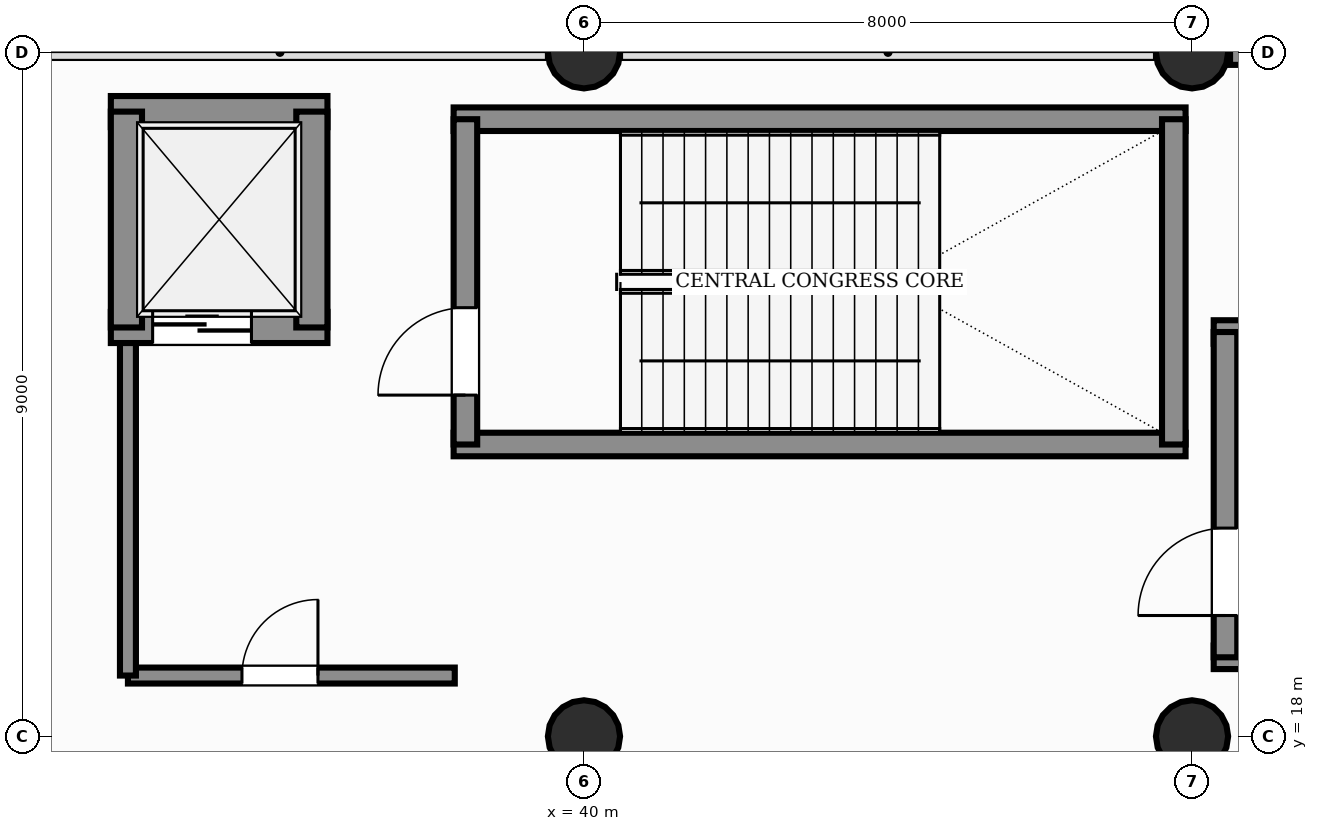
"""IFC4 building model, lengths in metres.
Left out: names, types, materials, properties, quantities, classifications, styles, units other than length and angle.
Written with IfcOpenShell. Run it as: python <this file> out.ifc"""

import sys

from ifc_helpers import new_model, si_unit, direction, frame, frame_2d, origin, origin_2d, place, context, subcontext, project, spatial, rectangle, circle, extrude, element, fill, save


model = new_model("IFC4")
c1 = context("Model", 3, precision=1e-05, world=origin(), true_north=direction((0.0, 1.0)))
c2 = subcontext(c1, "Body", "Model", "MODEL_VIEW")
j1 = project(units=[si_unit("LENGTHUNIT", "METRE"), si_unit("PLANEANGLEUNIT", "RADIAN")], contexts=[c1])
p1 = place(None, origin())
s1 = spatial("IfcSite", under=j1, at=p1, CompositionType="ELEMENT")
p2 = place(p1, origin())
s2 = spatial("IfcBuilding", under=s1, at=p2, CompositionType="ELEMENT")
p3 = place(p2, origin())
s3 = spatial("IfcBuildingStorey", under=s2, at=p3, CompositionType="ELEMENT", Elevation=0.0)
for number, where, z_axis, x_axis in (
    (1, (40.0, 18.0, 0.0), (0.0, 0.0, 1.0), (1.0, 0.0, 0.0)),
    (2, (40.0, 27.0, 0.0), (0.0, 0.0, 1.0), (1.0, 0.0, 0.0)),
    (3, (48.0, 18.0, 0.0), (0.0, 0.0, 1.0), (1.0, 0.0, 0.0)),
    (4, (48.0, 27.0, 0.0), (0.0, 0.0, 1.0), (1.0, 0.0, 0.0)),
):
    element("IfcColumn", number, at=place(p3, frame(where, z_axis=z_axis, x_axis=x_axis)), inside=s3, PredefinedType="COLUMN", context=c2, shape_type="SweptSolid", body=[
        extrude(circle(Radius=0.475, at=origin_2d()), origin(), (0.0, 0.0, 1.0), 6.0),
    ])
p4 = place(p3, frame((48.5, 27.0, 0.0), z_axis=(0.0, 0.0, 1.0), x_axis=(1.0, 0.0, 0.0)))
e5 = element("IfcWall", 5, at=p4, inside=s3, PredefinedType="SOLIDWALL", context=c2, shape_type="SweptSolid", body=[
    extrude(rectangle(XDim=7.0, YDim=0.33, at=frame_2d((3.5, 0.0))), origin(), (0.0, 0.0, 1.0), 4.7),
])
p5 = place(p4, frame((2.4, 0.0, 0.0)))
e6 = element("IfcOpeningElement", 6, at=p5, cuts=e5, PredefinedType="OPENING", context=c2, shape_type="SweptSolid", body=[
    extrude(rectangle(XDim=2.2, YDim=2.35, at=frame_2d((1.1, 1.175))), frame((0.0, 0.175, 0.0), z_axis=(0.0, -1.0, 0.0), x_axis=(1.0, 0.0, 0.0)), (0.0, 0.0, 1.0), 0.35),
])
for number, where, z_axis, x_axis in (
    (7, (38.285, 21.84, 0.0), (0.0, 0.0, 1.0), (1.0, 0.0, 0.0)),
    (8, (38.285, 26.12, 0.0), (0.0, 0.0, 1.0), (1.0, 0.0, 0.0)),
):
    element("IfcWall", number, at=place(p3, frame(where, z_axis=z_axis, x_axis=x_axis)), inside=s3, PredefinedType="SHEAR", context=c2, shape_type="SweptSolid", body=[
        extrude(rectangle(XDim=9.63, YDim=0.31, at=frame_2d((4.815, 0.0))), origin(), (0.0, 0.0, 1.0), 6.0),
    ])
p6 = place(p3, frame((38.44, 21.84, 0.0), z_axis=(0.0, 0.0, 1.0), x_axis=(0.0, 1.0, 0.0)))
e9 = element("IfcWall", 9, at=p6, inside=s3, PredefinedType="SHEAR", context=c2, shape_type="SweptSolid", body=[
    extrude(rectangle(XDim=4.28, YDim=0.31, at=frame_2d((2.14, 0.0))), origin(), (0.0, 0.0, 1.0), 6.0),
])
p7 = place(p6, frame((0.65, 0.0, 0.0)))
e10 = element("IfcOpeningElement", 10, at=p7, cuts=e9, PredefinedType="OPENING", context=c2, shape_type="SweptSolid", body=[
    extrude(rectangle(XDim=1.15, YDim=2.2, at=frame_2d((0.575, 1.1))), frame((0.0, 0.165, 0.0), z_axis=(0.0, -1.0, 0.0), x_axis=(1.0, 0.0, 0.0)), (0.0, 0.0, 1.0), 0.33),
])
p8 = place(p3, frame((47.76, 21.84, 0.0), z_axis=(0.0, 0.0, 1.0), x_axis=(0.0, 1.0, 0.0)))
e11 = element("IfcWall", 11, at=p8, inside=s3, PredefinedType="SHEAR", context=c2, shape_type="SweptSolid", body=[
    extrude(rectangle(XDim=4.28, YDim=0.31, at=frame_2d((2.14, 0.0))), origin(), (0.0, 0.0, 1.0), 6.0),
])
p9 = place(p3, frame((34.0, 18.8, 0.0), z_axis=(0.0, 0.0, 1.0), x_axis=(1.0, 0.0, 0.0)))
e12 = element("IfcWall", 12, at=p9, inside=s3, PredefinedType="PARTITIONING", context=c2, shape_type="SweptSolid", body=[
    extrude(rectangle(XDim=4.3, YDim=0.21, at=frame_2d((2.15, 0.0))), origin(), (0.0, 0.0, 1.0), 4.65),
])
p10 = place(p9, frame((1.5, 0.0, 0.0)))
e13 = element("IfcOpeningElement", 13, at=p10, cuts=e12, PredefinedType="OPENING", context=c2, shape_type="SweptSolid", body=[
    extrude(rectangle(XDim=1.0, YDim=2.15, at=frame_2d((0.5, 1.075))), frame((0.0, 0.115, 0.0), z_axis=(0.0, -1.0, 0.0), x_axis=(1.0, 0.0, 0.0)), (0.0, 0.0, 1.0), 0.23),
])
p11 = place(p3, frame((34.0, 18.8, 0.0), z_axis=(0.0, 0.0, 1.0), x_axis=(0.0, 1.0, 0.0)))
e14 = element("IfcWall", 14, at=p11, inside=s3, PredefinedType="PARTITIONING", context=c2, shape_type="SweptSolid", body=[
    extrude(rectangle(XDim=4.6, YDim=0.21, at=frame_2d((2.3, 0.0))), origin(), (0.0, 0.0, 1.0), 4.65),
])
p12 = place(p3, frame((33.775, 23.38, 0.0), z_axis=(0.0, 0.0, 1.0), x_axis=(1.0, 0.0, 0.0)))
e15 = element("IfcWall", 15, at=p12, inside=s3, PredefinedType="SHEAR", context=c2, shape_type="SweptSolid", body=[
    extrude(rectangle(XDim=2.85, YDim=0.41, at=frame_2d((1.425, 0.0))), origin(), (0.0, 0.0, 1.0), 6.0),
])
p13 = place(p12, frame((0.55, 0.0, 0.0)))
e16 = element("IfcOpeningElement", 16, at=p13, cuts=e15, PredefinedType="OPENING", context=c2, shape_type="SweptSolid", body=[
    extrude(rectangle(XDim=1.3, YDim=2.25, at=frame_2d((0.65, 1.125))), frame((0.0, 0.215, 0.0), z_axis=(0.0, -1.0, 0.0), x_axis=(1.0, 0.0, 0.0)), (0.0, 0.0, 1.0), 0.43),
])
p14 = place(p3, frame((33.775, 26.22, 0.0), z_axis=(0.0, 0.0, 1.0), x_axis=(1.0, 0.0, 0.0)))
e17 = element("IfcWall", 17, at=p14, inside=s3, PredefinedType="SHEAR", context=c2, shape_type="SweptSolid", body=[
    extrude(rectangle(XDim=2.85, YDim=0.41, at=frame_2d((1.425, 0.0))), origin(), (0.0, 0.0, 1.0), 6.0),
])
for number, where, z_axis, x_axis in (
    (18, (33.98, 23.38, 0.0), (0.0, 0.0, 1.0), (0.0, 1.0, 0.0)),
    (19, (36.42, 23.38, 0.0), (0.0, 0.0, 1.0), (0.0, 1.0, 0.0)),
):
    element("IfcWall", number, at=place(p3, frame(where, z_axis=z_axis, x_axis=x_axis)), inside=s3, PredefinedType="SHEAR", context=c2, shape_type="SweptSolid", body=[
        extrude(rectangle(XDim=2.84, YDim=0.41, at=frame_2d((1.42, 0.0))), origin(), (0.0, 0.0, 1.0), 6.0),
    ])
for number, where, z_axis, x_axis in (
    (20, (48.285, 19.04, 0.0), (0.0, 0.0, 1.0), (1.0, 0.0, 0.0)),
    (21, (48.285, 23.32, 0.0), (0.0, 0.0, 1.0), (1.0, 0.0, 0.0)),
):
    element("IfcWall", number, at=place(p3, frame(where, z_axis=z_axis, x_axis=x_axis)), inside=s3, PredefinedType="SHEAR", context=c2, shape_type="SweptSolid", body=[
        extrude(rectangle(XDim=9.63, YDim=0.31, at=frame_2d((4.815, 0.0))), origin(), (0.0, 0.0, 1.0), 6.0),
    ])
p15 = place(p3, frame((48.44, 19.04, 0.0), z_axis=(0.0, 0.0, 1.0), x_axis=(0.0, 1.0, 0.0)))
e22 = element("IfcWall", 22, at=p15, inside=s3, PredefinedType="SHEAR", context=c2, shape_type="SweptSolid", body=[
    extrude(rectangle(XDim=4.28, YDim=0.31, at=frame_2d((2.14, 0.0))), origin(), (0.0, 0.0, 1.0), 6.0),
])
p16 = place(p15, frame((0.55, 0.0, 0.0)))
e23 = element("IfcOpeningElement", 23, at=p16, cuts=e22, PredefinedType="OPENING", context=c2, shape_type="SweptSolid", body=[
    extrude(rectangle(XDim=1.15, YDim=2.2, at=frame_2d((0.575, 1.1))), frame((0.0, 0.165, 0.0), z_axis=(0.0, -1.0, 0.0), x_axis=(1.0, 0.0, 0.0)), (0.0, 0.0, 1.0), 0.33),
])
p17 = place(p7, origin())
e24 = element("IfcDoor", 24, at=p17, inside=s3, OperationType="SINGLE_SWING_LEFT", PredefinedType="DOOR", context=c2, shape_type="SweptSolid", body=[
    extrude(rectangle(XDim=1.15, YDim=2.2, at=frame_2d((0.575, 1.1))), frame((0.0, 0.025, 0.0), z_axis=(0.0, -1.0, 0.0), x_axis=(1.0, 0.0, 0.0)), (0.0, 0.0, 1.0), 0.05),
])
fill(e10, e24)
p18 = place(p10, origin())
e25 = element("IfcDoor", 25, at=p18, inside=s3, OperationType="SINGLE_SWING_RIGHT", PredefinedType="DOOR", context=c2, shape_type="SweptSolid", body=[
    extrude(rectangle(XDim=1.0, YDim=2.15, at=frame_2d((0.5, 1.075))), frame((0.0, 0.025, 0.0), z_axis=(0.0, -1.0, 0.0), x_axis=(1.0, 0.0, 0.0)), (0.0, 0.0, 1.0), 0.05),
])
fill(e13, e25)
p19 = place(p13, origin())
e26 = element("IfcDoor", 26, at=p19, inside=s3, OperationType="DOUBLE_DOOR_SLIDING", PredefinedType="DOOR", context=c2, shape_type="SweptSolid", body=[
    extrude(rectangle(XDim=1.3, YDim=2.25, at=frame_2d((0.65, 1.125))), frame((0.0, 0.025, 0.0), z_axis=(0.0, -1.0, 0.0), x_axis=(1.0, 0.0, 0.0)), (0.0, 0.0, 1.0), 0.05),
])
fill(e16, e26)
p20 = place(p16, origin())
e27 = element("IfcDoor", 27, at=p20, inside=s3, OperationType="SINGLE_SWING_LEFT", PredefinedType="DOOR", context=c2, shape_type="SweptSolid", body=[
    extrude(rectangle(XDim=1.15, YDim=2.2, at=frame_2d((0.575, 1.1))), frame((0.0, 0.025, 0.0), z_axis=(0.0, -1.0, 0.0), x_axis=(1.0, 0.0, 0.0)), (0.0, 0.0, 1.0), 0.05),
])
fill(e23, e27)
save(model, sys.argv[1])
